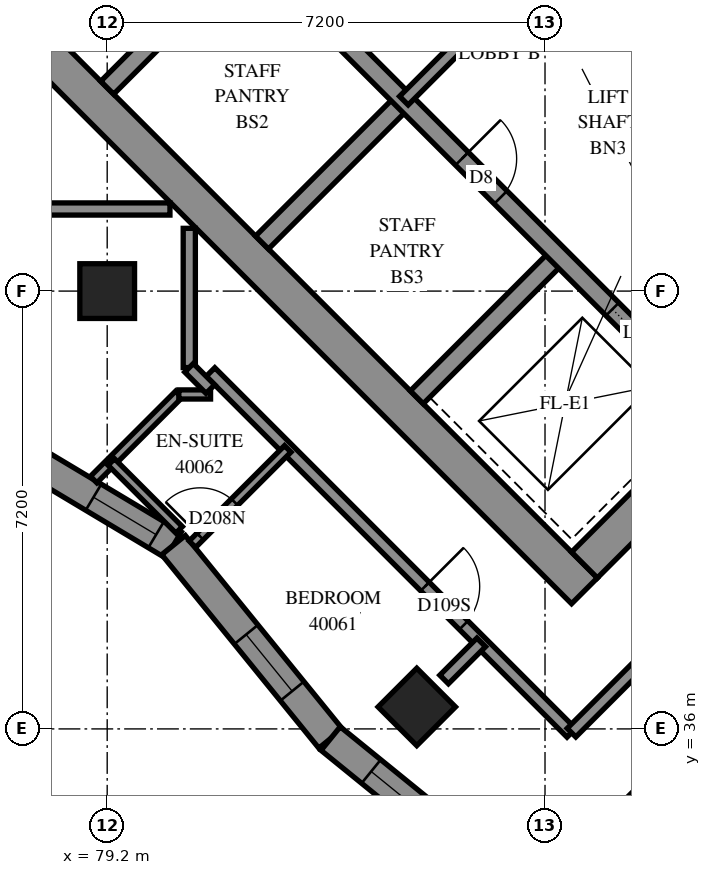
"""IFC4 building model, lengths in metres.
Left out: names, types, materials, properties, quantities, classifications, styles, units other than length and angle.
Written with IfcOpenShell. Run it as: python <this file> out.ifc"""

import sys

from ifc_helpers import new_model, si_unit, direction, frame, frame_2d, origin, origin_2d, place, context, subcontext, project, spatial, polyline, rectangle, outline, extrude, element, fill, save


model = new_model("IFC4")
c1 = context("Model", 3, precision=1e-05, world=origin(), true_north=direction((0.0, 1.0)))
c2 = subcontext(c1, "Body", "Model", "MODEL_VIEW")
j1 = project(units=[si_unit("LENGTHUNIT", "METRE"), si_unit("PLANEANGLEUNIT", "RADIAN")], contexts=[c1])
p1 = place(None, origin())
s1 = spatial("IfcSite", under=j1, at=p1, CompositionType="ELEMENT")
p2 = place(p1, origin())
s2 = spatial("IfcBuilding", under=s1, at=p2, CompositionType="ELEMENT")
p3 = place(p2, frame((0.0, 0.0, 149.0)))
s3 = spatial("IfcBuildingStorey", under=s2, at=p3, CompositionType="ELEMENT", Elevation=149.0)
for number, where, z_axis, x_axis in (
    (1, (79.2, 43.2, 0.0), (0.0, 0.0, 1.0), (1.0, 0.0, 0.0)),
    (2, (84.291, 36.362, 0.0), (0.0, 0.0, 1.0), (0.707, -0.707, 0.0)),
):
    element("IfcColumn", number, at=place(p3, frame(where, z_axis=z_axis, x_axis=x_axis)), inside=s3, PredefinedType="COLUMN", context=c2, shape_type="SweptSolid", body=[
        extrude(rectangle(XDim=0.9, YDim=0.9, at=origin_2d()), origin(), (0.0, 0.0, 1.0), 3.1),
    ])
p4 = place(p3, frame((76.018, 49.302, -0.3), z_axis=(0.0, 0.0, 1.0), x_axis=(0.7071067812, -0.7071067812, 0.0)))
e3 = element("IfcWall", 3, at=p4, inside=s3, PredefinedType="SHEAR", context=c2, shape_type="SweptSolid", body=[
    extrude(rectangle(XDim=15.6, YDim=0.6, at=frame_2d((7.8, 0.0))), origin(), (0.0, 0.0, 1.0), 2.7),
])
p5 = place(p3, frame((87.049, 38.695, -0.3), z_axis=(0.0, 0.0, 1.0), x_axis=(0.7071067812, 0.7071067812, 0.0)))
e4 = element("IfcWall", 4, at=p5, inside=s3, PredefinedType="SHEAR", context=c2, shape_type="SweptSolid", body=[
    extrude(rectangle(XDim=14.4, YDim=0.6, at=frame_2d((7.2, 0.0))), origin(), (0.0, 0.0, 1.0), 2.7),
])
p6 = place(p5, frame((4.55, 0.0, 0.3)))
e5 = element("IfcOpeningElement", 5, at=p6, cuts=e4, PredefinedType="OPENING", context=c2, shape_type="SweptSolid", body=[
    extrude(rectangle(XDim=1.1, YDim=2.1, at=frame_2d((0.55, 1.05))), frame((0.0, 0.31, 0.0), z_axis=(0.0, -1.0, 0.0), x_axis=(1.0, 0.0, 0.0)), (0.0, 0.0, 1.0), 0.62),
])
p7 = place(p5, frame((11.35, 0.0, 0.3)))
e6 = element("IfcOpeningElement", 6, at=p7, cuts=e4, PredefinedType="OPENING", context=c2, shape_type="SweptSolid", body=[
    extrude(rectangle(XDim=1.1, YDim=2.1, at=frame_2d((0.55, 1.05))), frame((0.0, 0.31, 0.0), z_axis=(0.0, -1.0, 0.0), x_axis=(1.0, 0.0, 0.0)), (0.0, 0.0, 1.0), 0.62),
])
p8 = place(p3, frame((79.2, 46.544, 0.0), z_axis=(0.0, 0.0, 1.0), x_axis=(0.7071219326, 0.7070916295, 0.0)))
e7 = element("IfcWall", 7, at=p8, inside=s3, PredefinedType="SOLIDWALL", context=c2, shape_type="SweptSolid", body=[
    extrude(rectangle(XDim=3.3, YDim=0.3, at=frame_2d((1.65, 0.0))), origin(), (0.0, 0.0, 1.0), 3.1),
])
for number, where, z_axis, x_axis in (
    (8, (81.746, 43.999, 0.0), (0.0, 0.0, 1.0), (0.707, 0.707, 0.0)),
    (9, (84.291, 41.453, 0.0), (0.0, 0.0, 1.0), (0.707, 0.707, 0.0)),
):
    element("IfcWall", number, at=place(p3, frame(where, z_axis=z_axis, x_axis=x_axis)), inside=s3, PredefinedType="SOLIDWALL", context=c2, shape_type="SweptSolid", body=[
        extrude(rectangle(XDim=3.3, YDim=0.3, at=frame_2d((1.65, 0.0))), origin(), (0.0, 0.0, 1.0), 3.1),
    ])
p9 = place(p3, frame((78.988, 51.423, 0.0), z_axis=(0.0, 0.0, 1.0), x_axis=(0.7071067812, -0.7071067812, 0.0)))
e10 = element("IfcWall", 10, at=p9, inside=s3, PredefinedType="SOLIDWALL", context=c2, shape_type="SweptSolid", body=[
    extrude(rectangle(XDim=14.4, YDim=0.3, at=frame_2d((7.2, 0.0))), origin(), (0.0, 0.0, 1.0), 3.1),
])
p10 = place(p9, frame((1.35, 0.0, 0.0)))
e11 = element("IfcOpeningElement", 11, at=p10, cuts=e10, PredefinedType="OPENING", context=c2, shape_type="SweptSolid", body=[
    extrude(rectangle(XDim=0.9, YDim=2.1, at=frame_2d((0.45, 1.05))), frame((0.0, 0.16, 0.0), z_axis=(0.0, -1.0, 0.0), x_axis=(1.0, 0.0, 0.0)), (0.0, 0.0, 1.0), 0.32),
])
p11 = place(p9, frame((4.95, 0.0, 0.0)))
e12 = element("IfcOpeningElement", 12, at=p11, cuts=e10, PredefinedType="OPENING", context=c2, shape_type="SweptSolid", body=[
    extrude(rectangle(XDim=0.9, YDim=2.1, at=frame_2d((0.45, 1.05))), frame((0.0, 0.16, 0.0), z_axis=(0.0, -1.0, 0.0), x_axis=(1.0, 0.0, 0.0)), (0.0, 0.0, 1.0), 0.32),
])
p12 = place(p9, frame((8.55, 0.0, 0.0)))
e13 = element("IfcOpeningElement", 13, at=p12, cuts=e10, PredefinedType="OPENING", context=c2, shape_type="SweptSolid", body=[
    extrude(rectangle(XDim=0.9, YDim=2.1, at=frame_2d((0.45, 1.05))), frame((0.0, 0.16, 0.0), z_axis=(0.0, -1.0, 0.0), x_axis=(1.0, 0.0, 0.0)), (0.0, 0.0, 1.0), 0.32),
])
p13 = place(p9, frame((12.05, 0.0, 0.0)))
e14 = element("IfcOpeningElement", 14, at=p13, cuts=e10, PredefinedType="OPENING", context=c2, shape_type="SweptSolid", body=[
    extrude(rectangle(XDim=1.1, YDim=2.1, at=frame_2d((0.55, 1.05))), frame((0.0, 0.16, 0.0), z_axis=(0.0, -1.0, 0.0), x_axis=(1.0, 0.0, 0.0)), (0.0, 0.0, 1.0), 0.32),
])
p14 = place(p3, frame((81.534, 53.969, 0.0), z_axis=(0.0, 0.0, 1.0), x_axis=(0.707103309, -0.7071102534, 0.0)))
e15 = element("IfcWall", 15, at=p14, inside=s3, PredefinedType="SOLIDWALL", context=c2, shape_type="SweptSolid", body=[
    extrude(rectangle(XDim=14.4, YDim=0.3, at=frame_2d((7.2, 0.0))), origin(), (0.0, 0.0, 1.0), 3.1),
])
p15 = place(p14, frame((1.25, 0.0, 0.0)))
e16 = element("IfcOpeningElement", 16, at=p15, cuts=e15, PredefinedType="OPENING", context=c2, shape_type="SweptSolid", body=[
    extrude(rectangle(XDim=1.1, YDim=2.1, at=frame_2d((0.55, 1.05))), frame((0.0, 0.16, 0.0), z_axis=(0.0, -1.0, 0.0), x_axis=(1.0, 0.0, 0.0)), (0.0, 0.0, 1.0), 0.32),
])
p16 = place(p14, frame((4.85, 0.0, 0.0)))
e17 = element("IfcOpeningElement", 17, at=p16, cuts=e15, PredefinedType="OPENING", context=c2, shape_type="SweptSolid", body=[
    extrude(rectangle(XDim=1.1, YDim=2.1, at=frame_2d((0.55, 1.05))), frame((0.0, 0.16, 0.0), z_axis=(0.0, -1.0, 0.0), x_axis=(1.0, 0.0, 0.0)), (0.0, 0.0, 1.0), 0.32),
])
p17 = place(p14, frame((8.45, 0.0, 0.0)))
e18 = element("IfcOpeningElement", 18, at=p17, cuts=e15, PredefinedType="OPENING", context=c2, shape_type="SweptSolid", body=[
    extrude(rectangle(XDim=1.1, YDim=2.1, at=frame_2d((0.55, 1.05))), frame((0.0, 0.16, 0.0), z_axis=(0.0, -1.0, 0.0), x_axis=(1.0, 0.0, 0.0)), (0.0, 0.0, 1.0), 0.32),
])
p18 = place(p14, frame((12.05, 0.0, 0.0)))
e19 = element("IfcOpeningElement", 19, at=p18, cuts=e15, PredefinedType="OPENING", context=c2, shape_type="SweptSolid", body=[
    extrude(rectangle(XDim=1.1, YDim=2.1, at=frame_2d((0.55, 1.05))), frame((0.0, 0.16, 0.0), z_axis=(0.0, -1.0, 0.0), x_axis=(1.0, 0.0, 0.0)), (0.0, 0.0, 1.0), 0.32),
])
p19 = place(p3, frame((76.635, 41.21, 0.0), z_axis=(0.0, 0.0, 1.0), x_axis=(0.8582520879, -0.513228364, 0.0)))
e20 = element("IfcWall", 20, at=p19, inside=s3, PredefinedType="SOLIDWALL", context=c2, shape_type="SweptSolid", body=[
    extrude(outline(polyline([(0.031, -0.25), (4.216, -0.25), (4.304, 0.25), (-0.031, 0.25), (0.031, -0.25)])), origin(), (0.0, 0.0, 1.0), 3.1),
])
p20 = place(p19, frame((0.347, 0.0, 0.45)))
e21 = element("IfcOpeningElement", 21, at=p20, cuts=e20, PredefinedType="OPENING", context=c2, shape_type="SweptSolid", body=[
    extrude(rectangle(XDim=1.2, YDim=2.5, at=frame_2d((0.6, 1.25))), frame((0.0, 0.26, 0.0), z_axis=(0.0, -1.0, 0.0), x_axis=(1.0, 0.0, 0.0)), (0.0, 0.0, 1.0), 0.52),
])
p21 = place(p19, frame((2.727, 0.0, 0.45)))
e22 = element("IfcOpeningElement", 22, at=p21, cuts=e20, PredefinedType="OPENING", context=c2, shape_type="SweptSolid", body=[
    extrude(rectangle(XDim=1.2, YDim=2.5, at=frame_2d((0.6, 1.25))), frame((0.0, 0.26, 0.0), z_axis=(0.0, -1.0, 0.0), x_axis=(1.0, 0.0, 0.0)), (0.0, 0.0, 1.0), 0.52),
])
p22 = place(p3, frame((80.291, 39.023, 0.0), z_axis=(0.0, 0.0, 1.0), x_axis=(0.6303794952, -0.7762871195, 0.0)))
e23 = element("IfcWall", 23, at=p22, inside=s3, PredefinedType="SOLIDWALL", context=c2, shape_type="SweptSolid", body=[
    extrude(outline(polyline([(0.044, -0.25), (4.124, -0.25), (4.072, 0.25), (-0.044, 0.25), (0.044, -0.25)])), origin(), (0.0, 0.0, 1.0), 3.1),
])
p23 = place(p22, frame((1.894, 0.0, 0.45)))
e24 = element("IfcOpeningElement", 24, at=p23, cuts=e23, PredefinedType="OPENING", context=c2, shape_type="SweptSolid", body=[
    extrude(rectangle(XDim=1.2, YDim=2.5, at=frame_2d((0.6, 1.25))), frame((0.0, 0.26, 0.0), z_axis=(0.0, -1.0, 0.0), x_axis=(1.0, 0.0, 0.0)), (0.0, 0.0, 1.0), 0.52),
])
p24 = place(p3, frame((82.874, 35.842, 0.0), z_axis=(0.0, 0.0, 1.0), x_axis=(0.7762833982, -0.6303840779, 0.0)))
e25 = element("IfcWall", 25, at=p24, inside=s3, PredefinedType="SOLIDWALL", context=c2, shape_type="SweptSolid", body=[
    extrude(outline(polyline([(-0.026, -0.25), (4.054, -0.25), (4.106, 0.25), (0.026, 0.25), (-0.026, -0.25)])), origin(), (0.0, 0.0, 1.0), 3.1),
])
p25 = place(p24, frame((0.859, 0.0, 0.45)))
e26 = element("IfcOpeningElement", 26, at=p25, cuts=e25, PredefinedType="OPENING", context=c2, shape_type="SweptSolid", body=[
    extrude(rectangle(XDim=2.8, YDim=2.5, at=frame_2d((1.4, 1.25))), frame((0.0, 0.26, 0.0), z_axis=(0.0, -1.0, 0.0), x_axis=(1.0, 0.0, 0.0)), (0.0, 0.0, 1.0), 0.52),
])
p26 = place(p3, frame((84.079, 46.332, 0.0), z_axis=(0.0, 0.0, 1.0), x_axis=(0.7071067812, 0.7071067812, 0.0)))
e27 = element("IfcWall", 27, at=p26, inside=s3, PredefinedType="PARTITIONING", context=c2, shape_type="SweptSolid", body=[
    extrude(rectangle(XDim=3.6, YDim=0.2, at=frame_2d((1.8, 0.0))), origin(), (0.0, 0.0, 1.0), 3.1),
])
p27 = place(p3, frame((80.899, 41.869, 0.0), z_axis=(0.0, 0.0, 1.0), x_axis=(0.7071067812, -0.7071067812, 0.0)))
e28 = element("IfcWall", 28, at=p27, inside=s3, PredefinedType="PARTITIONING", context=c2, shape_type="SweptSolid", body=[
    extrude(rectangle(XDim=8.392, YDim=0.2, at=frame_2d((4.196, 0.0))), origin(), (0.0, 0.0, 1.0), 3.1),
])
p28 = place(p27, frame((4.988, 0.0, 0.0)))
e29 = element("IfcOpeningElement", 29, at=p28, cuts=e28, PredefinedType="OPENING", context=c2, shape_type="SweptSolid", body=[
    extrude(rectangle(XDim=0.9, YDim=2.1, at=frame_2d((0.45, 1.05))), frame((0.0, 0.11, 0.0), z_axis=(0.0, -1.0, 0.0), x_axis=(1.0, 0.0, 0.0)), (0.0, 0.0, 1.0), 0.22),
])
p29 = place(p3, frame((86.836, 35.938, 0.0), z_axis=(0.0, 0.0, 1.0), x_axis=(0.7071067812, 0.7071067812, 0.0)))
e30 = element("IfcWall", 30, at=p29, inside=s3, PredefinedType="PARTITIONING", context=c2, shape_type="SweptSolid", body=[
    extrude(rectangle(XDim=8.2, YDim=0.2, at=frame_2d((4.1, 0.0))), origin(), (0.0, 0.0, 1.0), 3.1),
])
p30 = place(p3, frame((86.33, 33.311, 0.0), z_axis=(0.0, 0.0, 1.0), x_axis=(0.7071005427, 0.7071130196, 0.0)))
e31 = element("IfcWall", 31, at=p30, inside=s3, PredefinedType="PARTITIONING", context=c2, shape_type="SweptSolid", body=[
    extrude(rectangle(XDim=8.015, YDim=0.2, at=frame_2d((4.007, 0.0))), origin(), (0.0, 0.0, 1.0), 3.1),
])
for number, where, z_axis, x_axis in (
    (32, (77.942, 44.55, 0.0), (0.0, 0.0, 1.0), (1.0, 0.0, 0.0)),
    (33, (80.55, 41.942, 0.0), (0.0, 0.0, 1.0), (0.0, 1.0, 0.0)),
):
    element("IfcWall", number, at=place(p3, frame(where, z_axis=z_axis, x_axis=x_axis)), inside=s3, PredefinedType="PARTITIONING", context=c2, shape_type="SweptSolid", body=[
        extrude(rectangle(XDim=2.29, YDim=0.2, at=frame_2d((1.145, 0.0))), origin(), (0.0, 0.0, 1.0), 3.1),
    ])
p31 = place(p3, frame((80.601, 39.038, 0.0), z_axis=(0.0, 0.0, 1.0), x_axis=(0.7071067812, 0.7071067812, 0.0)))
e34 = element("IfcWall", 34, at=p31, inside=s3, PredefinedType="PARTITIONING", context=c2, shape_type="SweptSolid", body=[
    extrude(rectangle(XDim=2.217, YDim=0.15, at=frame_2d((1.108, 0.0))), origin(), (0.0, 0.0, 1.0), 3.1),
])
p32 = place(p31, frame((0.18, 0.0, 0.0)))
e35 = element("IfcOpeningElement", 35, at=p32, cuts=e34, PredefinedType="OPENING", context=c2, shape_type="SweptSolid", body=[
    extrude(rectangle(XDim=0.8, YDim=2.1, at=frame_2d((0.4, 1.05))), frame((0.0, 0.085, 0.0), z_axis=(0.0, -1.0, 0.0), x_axis=(1.0, 0.0, 0.0)), (0.0, 0.0, 1.0), 0.17),
])
p33 = place(p3, frame((78.977, 40.1, 0.0), z_axis=(0.0, 0.0, 1.0), x_axis=(0.7071320264, 0.707081535, 0.0)))
e36 = element("IfcWall", 36, at=p33, inside=s3, PredefinedType="PARTITIONING", context=c2, shape_type="SweptSolid", body=[
    extrude(rectangle(XDim=1.98, YDim=0.15, at=frame_2d((0.99, 0.0))), origin(), (0.0, 0.0, 1.0), 3.1),
])
p34 = place(p3, frame((79.267, 40.389, 0.0), z_axis=(0.0, 0.0, 1.0), x_axis=(0.7071067812, -0.7071067812, 0.0)))
e37 = element("IfcWall", 37, at=p34, inside=s3, PredefinedType="PARTITIONING", context=c2, shape_type="SweptSolid", body=[
    extrude(rectangle(XDim=1.578, YDim=0.15, at=frame_2d((0.789, 0.0))), origin(), (0.0, 0.0, 1.0), 3.1),
])
p35 = place(p3, frame((84.741, 36.813, 0.0), z_axis=(0.0, 0.0, 1.0), x_axis=(0.7071067812, 0.7071067812, 0.0)))
e38 = element("IfcWall", 38, at=p35, inside=s3, PredefinedType="PARTITIONING", context=c2, shape_type="SweptSolid", body=[
    extrude(rectangle(XDim=0.863, YDim=0.2, at=frame_2d((0.431, 0.0))), origin(), (0.0, 0.0, 1.0), 3.1),
])
p36 = place(p3, frame((80.378, 41.5, 0.0), z_axis=(0.0, 0.0, 1.0), x_axis=(1.0, 0.0, 0.0)))
e39 = element("IfcWall", 39, at=p36, inside=s3, PredefinedType="PARTITIONING", context=c2, shape_type="SweptSolid", body=[
    extrude(rectangle(XDim=0.522, YDim=0.15, at=frame_2d((0.261, 0.0))), origin(), (0.0, 0.0, 1.0), 3.1),
])
p37 = place(p3, frame((80.546, 41.938, 0.0), z_axis=(0.0, 0.0, 1.0), x_axis=(0.7071067812, -0.7071067812, 0.0)))
e40 = element("IfcWall", 40, at=p37, inside=s3, PredefinedType="PARTITIONING", context=c2, shape_type="SweptSolid", body=[
    extrude(rectangle(XDim=0.495, YDim=0.2, at=frame_2d((0.247, 0.0))), origin(), (0.0, 0.0, 1.0), 3.1),
])
p38 = place(p21, origin())
e41 = element("IfcWindow", 41, at=p38, inside=s3, PartitioningType="SINGLE_PANEL", PredefinedType="WINDOW", context=c2, shape_type="SweptSolid", body=[
    extrude(rectangle(XDim=1.2, YDim=2.5, at=frame_2d((0.6, 1.25))), frame((0.0, 0.18, 0.0), z_axis=(0.0, -1.0, 0.0), x_axis=(1.0, 0.0, 0.0)), (0.0, 0.0, 1.0), 0.06),
])
fill(e22, e41)
p39 = place(p23, origin())
e42 = element("IfcWindow", 42, at=p39, inside=s3, PartitioningType="SINGLE_PANEL", PredefinedType="WINDOW", context=c2, shape_type="SweptSolid", body=[
    extrude(rectangle(XDim=1.2, YDim=2.5, at=frame_2d((0.6, 1.25))), frame((0.0, 0.18, 0.0), z_axis=(0.0, -1.0, 0.0), x_axis=(1.0, 0.0, 0.0)), (0.0, 0.0, 1.0), 0.06),
])
fill(e24, e42)
p40 = place(p25, origin())
e43 = element("IfcWindow", 43, at=p40, inside=s3, PartitioningType="SINGLE_PANEL", PredefinedType="WINDOW", context=c2, shape_type="SweptSolid", body=[
    extrude(rectangle(XDim=2.8, YDim=2.5, at=frame_2d((1.4, 1.25))), frame((0.0, 0.18, 0.0), z_axis=(0.0, -1.0, 0.0), x_axis=(1.0, 0.0, 0.0)), (0.0, 0.0, 1.0), 0.06),
])
fill(e26, e43)
p41 = place(p12, origin())
e44 = element("IfcDoor", 44, at=p41, inside=s3, OperationType="SINGLE_SWING_LEFT", PredefinedType="DOOR", context=c2, shape_type="SweptSolid", body=[
    extrude(rectangle(XDim=0.9, YDim=2.1, at=frame_2d((0.45, 1.05))), frame((0.0, 0.025, 0.0), z_axis=(0.0, -1.0, 0.0), x_axis=(1.0, 0.0, 0.0)), (0.0, 0.0, 1.0), 0.05),
])
fill(e13, e44)
p42 = place(p13, origin())
e45 = element("IfcDoor", 45, at=p42, inside=s3, OperationType="SLIDING_TO_RIGHT", PredefinedType="DOOR", context=c2, shape_type="SweptSolid", body=[
    extrude(rectangle(XDim=1.1, YDim=2.1, at=frame_2d((0.55, 1.05))), frame((0.0, 0.025, 0.0), z_axis=(0.0, -1.0, 0.0), x_axis=(1.0, 0.0, 0.0)), (0.0, 0.0, 1.0), 0.05),
])
fill(e14, e45)
p43 = place(p28, origin())
e46 = element("IfcDoor", 46, at=p43, inside=s3, OperationType="SINGLE_SWING_RIGHT", PredefinedType="DOOR", context=c2, shape_type="SweptSolid", body=[
    extrude(rectangle(XDim=0.9, YDim=2.1, at=frame_2d((0.45, 1.05))), frame((0.0, 0.025, 0.0), z_axis=(0.0, -1.0, 0.0), x_axis=(1.0, 0.0, 0.0)), (0.0, 0.0, 1.0), 0.05),
])
fill(e29, e46)
p44 = place(p32, origin())
e47 = element("IfcDoor", 47, at=p44, inside=s3, OperationType="SINGLE_SWING_RIGHT", PredefinedType="DOOR", context=c2, shape_type="SweptSolid", body=[
    extrude(rectangle(XDim=0.8, YDim=2.1, at=frame_2d((0.4, 1.05))), frame((0.0, 0.025, 0.0), z_axis=(0.0, -1.0, 0.0), x_axis=(1.0, 0.0, 0.0)), (0.0, 0.0, 1.0), 0.05),
])
fill(e35, e47)
save(model, sys.argv[1])
